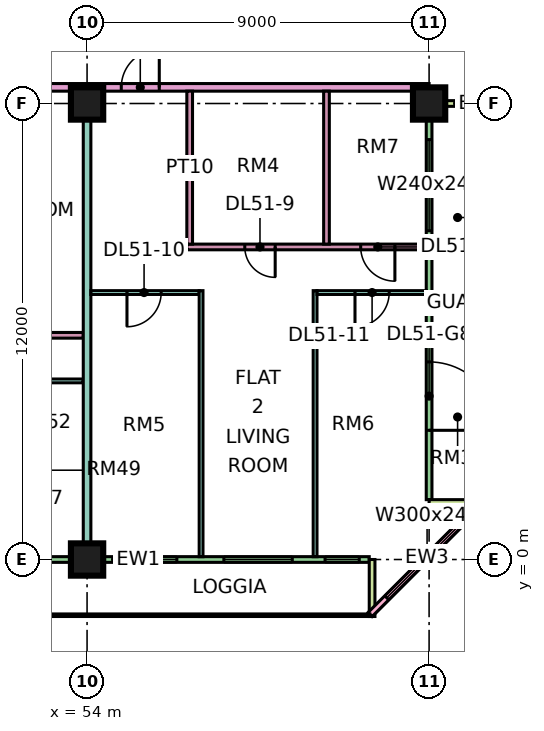
"""IFC4 building model, lengths in metres.
Left out: names, types, materials, properties, quantities, classifications, styles, units other than length and angle.
Written with IfcOpenShell. Run it as: python <this file> out.ifc"""

import sys

from ifc_helpers import new_model, si_unit, direction, frame, frame_2d, origin, origin_2d, place, context, subcontext, project, spatial, rectangle, extrude, element, fill, save


model = new_model("IFC4")
c1 = context("Model", 3, precision=1e-05, world=origin(), true_north=direction((0.0, 1.0)))
c2 = subcontext(c1, "Body", "Model", "MODEL_VIEW")
j1 = project(units=[si_unit("LENGTHUNIT", "METRE"), si_unit("PLANEANGLEUNIT", "RADIAN")], contexts=[c1])
p1 = place(None, origin())
s1 = spatial("IfcSite", under=j1, at=p1, CompositionType="ELEMENT")
p2 = place(p1, origin())
s2 = spatial("IfcBuilding", under=s1, at=p2, CompositionType="ELEMENT")
p3 = place(p2, frame((0.0, 0.0, 219.15)))
s3 = spatial("IfcBuildingStorey", under=s2, at=p3, CompositionType="ELEMENT", Elevation=219.15)
for number, where, z_axis, x_axis in (
    (1, (54.0, 0.0, 0.0), (0.0, 0.0, 1.0), (1.0, 0.0, 0.0)),
    (2, (54.0, 12.0, 0.0), (0.0, 0.0, 1.0), (1.0, 0.0, 0.0)),
    (3, (63.0, 12.0, 0.0), (0.0, 0.0, 1.0), (1.0, 0.0, 0.0)),
):
    element("IfcColumn", number, at=place(p3, frame(where, z_axis=z_axis, x_axis=x_axis)), inside=s3, PredefinedType="COLUMN", context=c2, shape_type="SweptSolid", body=[
        extrude(rectangle(XDim=0.85, YDim=0.85, at=origin_2d()), origin(), (0.0, 0.0, 1.0), 3.75),
    ])
p4 = place(p3, frame((48.075, 0.0, 0.0), z_axis=(0.0, 0.0, 1.0), x_axis=(1.0, 0.0, 0.0)))
e4 = element("IfcWall", 4, at=p4, inside=s3, PredefinedType="SOLIDWALL", context=c2, shape_type="SweptSolid", body=[
    extrude(rectangle(XDim=13.35, YDim=0.15, at=frame_2d((6.675, 0.0))), origin(), (0.0, 0.0, 1.0), 3.35),
])
p5 = place(p4, frame((0.562, 0.0, 0.45)))
e5 = element("IfcOpeningElement", 5, at=p5, cuts=e4, PredefinedType="OPENING", context=c2, shape_type="SweptSolid", body=[
    extrude(rectangle(XDim=1.8, YDim=2.4, at=frame_2d((0.9, 1.2))), frame((0.0, 0.085, 0.0), z_axis=(0.0, -1.0, 0.0), x_axis=(1.0, 0.0, 0.0)), (0.0, 0.0, 1.0), 0.17),
])
p6 = place(p4, frame((3.562, 0.0, 0.0)))
e6 = element("IfcOpeningElement", 6, at=p6, cuts=e4, PredefinedType="OPENING", context=c2, shape_type="SweptSolid", body=[
    extrude(rectangle(XDim=1.2, YDim=2.4, at=frame_2d((0.6, 1.2))), frame((0.0, 0.085, 0.0), z_axis=(0.0, -1.0, 0.0), x_axis=(1.0, 0.0, 0.0)), (0.0, 0.0, 1.0), 0.17),
])
p7 = place(p4, frame((7.087, 0.0, 0.45)))
e7 = element("IfcOpeningElement", 7, at=p7, cuts=e4, PredefinedType="OPENING", context=c2, shape_type="SweptSolid", body=[
    extrude(rectangle(XDim=1.2, YDim=2.4, at=frame_2d((0.6, 1.2))), frame((0.0, 0.085, 0.0), z_axis=(0.0, -1.0, 0.0), x_axis=(1.0, 0.0, 0.0)), (0.0, 0.0, 1.0), 0.17),
])
p8 = place(p4, frame((9.525, 0.0, 0.45)))
e8 = element("IfcOpeningElement", 8, at=p8, cuts=e4, PredefinedType="OPENING", context=c2, shape_type="SweptSolid", body=[
    extrude(rectangle(XDim=1.8, YDim=2.4, at=frame_2d((0.9, 1.2))), frame((0.0, 0.085, 0.0), z_axis=(0.0, -1.0, 0.0), x_axis=(1.0, 0.0, 0.0)), (0.0, 0.0, 1.0), 0.17),
])
p9 = place(p4, frame((12.188, 0.0, 0.45)))
e9 = element("IfcOpeningElement", 9, at=p9, cuts=e4, PredefinedType="OPENING", context=c2, shape_type="SweptSolid", body=[
    extrude(rectangle(XDim=0.9, YDim=2.4, at=frame_2d((0.45, 1.2))), frame((0.0, 0.085, 0.0), z_axis=(0.0, -1.0, 0.0), x_axis=(1.0, 0.0, 0.0)), (0.0, 0.0, 1.0), 0.17),
])
p10 = place(p3, frame((61.5, -1.5, 0.0), z_axis=(0.0, 0.0, 1.0), x_axis=(0.0, 1.0, 0.0)))
e10 = element("IfcWall", 10, at=p10, inside=s3, PredefinedType="SOLIDWALL", context=c2, shape_type="SweptSolid", body=[
    extrude(rectangle(XDim=1.5, YDim=0.15, at=frame_2d((0.75, 0.0))), origin(), (0.0, 0.0, 1.0), 3.35),
])
p11 = place(p3, frame((61.447, -1.447, 0.0), z_axis=(0.0, 0.0, 1.0), x_axis=(0.707106781187, 0.707106781187, 0.0)))
e11 = element("IfcWall", 11, at=p11, inside=s3, PredefinedType="SOLIDWALL", context=c2, shape_type="SweptSolid", body=[
    extrude(rectangle(XDim=4.243, YDim=0.15, at=frame_2d((2.121, 0.0))), origin(), (0.0, 0.0, 1.0), 3.35),
])
p12 = place(p11, frame((0.621, 0.0, 0.45)))
e12 = element("IfcOpeningElement", 12, at=p12, cuts=e11, PredefinedType="OPENING", context=c2, shape_type="SweptSolid", body=[
    extrude(rectangle(XDim=3.0, YDim=2.4, at=frame_2d((1.5, 1.2))), frame((0.0, 0.085, 0.0), z_axis=(0.0, -1.0, 0.0), x_axis=(1.0, 0.0, 0.0)), (0.0, 0.0, 1.0), 0.17),
])
p13 = place(p3, frame((63.0, 1.575, 0.0), z_axis=(0.0, 0.0, 1.0), x_axis=(0.0, 1.0, 0.0)))
e13 = element("IfcWall", 13, at=p13, inside=s3, PredefinedType="SOLIDWALL", context=c2, shape_type="SweptSolid", body=[
    extrude(rectangle(XDim=10.35, YDim=0.15, at=frame_2d((5.175, 0.0))), origin(), (0.0, 0.0, 1.0), 3.35),
])
p14 = place(p13, frame((1.825, 0.0, 0.0)))
e14 = element("IfcOpeningElement", 14, at=p14, cuts=e13, PredefinedType="OPENING", context=c2, shape_type="SweptSolid", body=[
    extrude(rectangle(XDim=1.8, YDim=2.4, at=frame_2d((0.9, 1.2))), frame((0.0, 0.085, 0.0), z_axis=(0.0, -1.0, 0.0), x_axis=(1.0, 0.0, 0.0)), (0.0, 0.0, 1.0), 0.17),
])
p15 = place(p13, frame((7.075, 0.0, 0.45)))
e15 = element("IfcOpeningElement", 15, at=p15, cuts=e13, PredefinedType="OPENING", context=c2, shape_type="SweptSolid", body=[
    extrude(rectangle(XDim=2.4, YDim=2.4, at=frame_2d((1.2, 1.2))), frame((0.0, 0.085, 0.0), z_axis=(0.0, -1.0, 0.0), x_axis=(1.0, 0.0, 0.0)), (0.0, 0.0, 1.0), 0.17),
])
for number, where, z_axis, x_axis in (
    (16, (64.5, 1.5, 0.0), (0.0, 0.0, 1.0), (-1.0, 0.0, 0.0)),
    (17, (64.5, 12.0, 0.0), (0.0, 0.0, 1.0), (-1.0, 0.0, 0.0)),
):
    element("IfcWall", number, at=place(p3, frame(where, z_axis=z_axis, x_axis=x_axis)), inside=s3, PredefinedType="SOLIDWALL", context=c2, shape_type="SweptSolid", body=[
        extrude(rectangle(XDim=1.5, YDim=0.15, at=frame_2d((0.75, 0.0))), origin(), (0.0, 0.0, 1.0), 3.35),
    ])
p16 = place(p3, frame((33.05, 4.7, 0.0), z_axis=(0.0, 0.0, 1.0), x_axis=(1.0, 0.0, 0.0)))
e18 = element("IfcWall", 18, at=p16, inside=s3, PredefinedType="PARTITIONING", context=c2, shape_type="SweptSolid", body=[
    extrude(rectangle(XDim=20.85, YDim=0.1, at=frame_2d((10.425, 0.0))), origin(), (0.0, 0.0, 1.0), 3.35),
])
p17 = place(p16, frame((10.0, 0.0, 0.0)))
e19 = element("IfcOpeningElement", 19, at=p17, cuts=e18, PredefinedType="OPENING", context=c2, shape_type="SweptSolid", body=[
    extrude(rectangle(XDim=0.9, YDim=2.1, at=frame_2d((0.45, 1.05))), frame((0.0, 0.06, 0.0), z_axis=(0.0, -1.0, 0.0), x_axis=(1.0, 0.0, 0.0)), (0.0, 0.0, 1.0), 0.12),
])
p18 = place(p16, frame((13.0, 0.0, 0.0)))
e20 = element("IfcOpeningElement", 20, at=p18, cuts=e18, PredefinedType="OPENING", context=c2, shape_type="SweptSolid", body=[
    extrude(rectangle(XDim=0.9, YDim=2.1, at=frame_2d((0.45, 1.05))), frame((0.0, 0.06, 0.0), z_axis=(0.0, -1.0, 0.0), x_axis=(1.0, 0.0, 0.0)), (0.0, 0.0, 1.0), 0.12),
])
p19 = place(p16, frame((16.0, 0.0, 0.0)))
e21 = element("IfcOpeningElement", 21, at=p19, cuts=e18, PredefinedType="OPENING", context=c2, shape_type="SweptSolid", body=[
    extrude(rectangle(XDim=0.9, YDim=2.1, at=frame_2d((0.45, 1.05))), frame((0.0, 0.06, 0.0), z_axis=(0.0, -1.0, 0.0), x_axis=(1.0, 0.0, 0.0)), (0.0, 0.0, 1.0), 0.12),
])
p20 = place(p16, frame((19.0, 0.0, 0.0)))
e22 = element("IfcOpeningElement", 22, at=p20, cuts=e18, PredefinedType="OPENING", context=c2, shape_type="SweptSolid", body=[
    extrude(rectangle(XDim=0.9, YDim=2.1, at=frame_2d((0.45, 1.05))), frame((0.0, 0.06, 0.0), z_axis=(0.0, -1.0, 0.0), x_axis=(1.0, 0.0, 0.0)), (0.0, 0.0, 1.0), 0.12),
])
p21 = place(p16, frame((4.0, 0.0, 0.0)))
e23 = element("IfcOpeningElement", 23, at=p21, cuts=e18, PredefinedType="OPENING", context=c2, shape_type="SweptSolid", body=[
    extrude(rectangle(XDim=0.9, YDim=2.1, at=frame_2d((0.45, 1.05))), frame((0.0, 0.06, 0.0), z_axis=(0.0, -1.0, 0.0), x_axis=(1.0, 0.0, 0.0)), (0.0, 0.0, 1.0), 0.12),
])
p22 = place(p3, frame((40.65, 12.425, 0.0), z_axis=(0.0, 0.0, 1.0), x_axis=(1.0, 0.0, 0.0)))
e24 = element("IfcWall", 24, at=p22, inside=s3, PredefinedType="PARTITIONING", context=c2, shape_type="SweptSolid", body=[
    extrude(rectangle(XDim=22.35, YDim=0.2, at=frame_2d((11.175, 0.0))), origin(), (0.0, 0.0, 1.0), 3.35),
])
p23 = place(p22, frame((14.25, 0.0, 0.0)))
e25 = element("IfcOpeningElement", 25, at=p23, cuts=e24, PredefinedType="OPENING", context=c2, shape_type="SweptSolid", body=[
    extrude(rectangle(XDim=1.0, YDim=2.1, at=frame_2d((0.5, 1.05))), frame((0.0, 0.11, 0.0), z_axis=(0.0, -1.0, 0.0), x_axis=(1.0, 0.0, 0.0)), (0.0, 0.0, 1.0), 0.22),
])
p24 = place(p22, frame((1.05, 0.0, 0.0)))
e26 = element("IfcOpeningElement", 26, at=p24, cuts=e24, PredefinedType="OPENING", context=c2, shape_type="SweptSolid", body=[
    extrude(rectangle(XDim=1.0, YDim=2.1, at=frame_2d((0.5, 1.05))), frame((0.0, 0.11, 0.0), z_axis=(0.0, -1.0, 0.0), x_axis=(1.0, 0.0, 0.0)), (0.0, 0.0, 1.0), 0.22),
])
p25 = place(p3, frame((43.575, 5.9, 0.0), z_axis=(0.0, 0.0, 1.0), x_axis=(1.0, 0.0, 0.0)))
e27 = element("IfcWall", 27, at=p25, inside=s3, PredefinedType="PARTITIONING", context=c2, shape_type="SweptSolid", body=[
    extrude(rectangle(XDim=10.325, YDim=0.15, at=frame_2d((5.163, 0.0))), origin(), (0.0, 0.0, 1.0), 3.35),
])
p26 = place(p25, frame((1.825, 0.0, 0.0)))
e28 = element("IfcOpeningElement", 28, at=p26, cuts=e27, PredefinedType="OPENING", context=c2, shape_type="SweptSolid", body=[
    extrude(rectangle(XDim=0.8, YDim=2.1, at=frame_2d((0.4, 1.05))), frame((0.0, 0.085, 0.0), z_axis=(0.0, -1.0, 0.0), x_axis=(1.0, 0.0, 0.0)), (0.0, 0.0, 1.0), 0.17),
])
p27 = place(p25, frame((6.975, 0.0, 0.0)))
e29 = element("IfcOpeningElement", 29, at=p27, cuts=e27, PredefinedType="OPENING", context=c2, shape_type="SweptSolid", body=[
    extrude(rectangle(XDim=0.9, YDim=2.1, at=frame_2d((0.45, 1.05))), frame((0.0, 0.085, 0.0), z_axis=(0.0, -1.0, 0.0), x_axis=(1.0, 0.0, 0.0)), (0.0, 0.0, 1.0), 0.17),
])
p28 = place(p3, frame((54.0, 0.074, 0.0), z_axis=(0.0, 0.0, 1.0), x_axis=(0.0, 1.0, 0.0)))
e30 = element("IfcWall", 30, at=p28, inside=s3, PredefinedType="PARTITIONING", context=c2, shape_type="SweptSolid", body=[
    extrude(rectangle(XDim=12.251, YDim=0.2, at=frame_2d((6.125, 0.0))), origin(), (0.0, 0.0, 1.0), 3.35),
])
p29 = place(p3, frame((54.1, 7.025, 0.0), z_axis=(0.0, 0.0, 1.0), x_axis=(1.0, 0.0, 0.0)))
e31 = element("IfcWall", 31, at=p29, inside=s3, PredefinedType="PARTITIONING", context=c2, shape_type="SweptSolid", body=[
    extrude(rectangle(XDim=2.85, YDim=0.1, at=frame_2d((1.425, 0.0))), origin(), (0.0, 0.0, 1.0), 3.35),
])
p30 = place(p29, frame((0.95, 0.0, 0.0)))
e32 = element("IfcOpeningElement", 32, at=p30, cuts=e31, PredefinedType="OPENING", context=c2, shape_type="SweptSolid", body=[
    extrude(rectangle(XDim=0.9, YDim=2.1, at=frame_2d((0.45, 1.05))), frame((0.0, 0.06, 0.0), z_axis=(0.0, -1.0, 0.0), x_axis=(1.0, 0.0, 0.0)), (0.0, 0.0, 1.0), 0.12),
])
p31 = place(p3, frame((56.625, 8.225, 0.0), z_axis=(0.0, 0.0, 1.0), x_axis=(1.0, 0.0, 0.0)))
e33 = element("IfcWall", 33, at=p31, inside=s3, PredefinedType="PARTITIONING", context=c2, shape_type="SweptSolid", body=[
    extrude(rectangle(XDim=6.301, YDim=0.15, at=frame_2d((3.15, 0.0))), origin(), (0.0, 0.0, 1.0), 3.35),
])
p32 = place(p31, frame((1.525, 0.0, 0.0)))
e34 = element("IfcOpeningElement", 34, at=p32, cuts=e33, PredefinedType="OPENING", context=c2, shape_type="SweptSolid", body=[
    extrude(rectangle(XDim=0.8, YDim=2.1, at=frame_2d((0.4, 1.05))), frame((0.0, 0.085, 0.0), z_axis=(0.0, -1.0, 0.0), x_axis=(1.0, 0.0, 0.0)), (0.0, 0.0, 1.0), 0.17),
])
p33 = place(p31, frame((4.575, 0.0, 0.0)))
e35 = element("IfcOpeningElement", 35, at=p33, cuts=e33, PredefinedType="OPENING", context=c2, shape_type="SweptSolid", body=[
    extrude(rectangle(XDim=0.9, YDim=2.1, at=frame_2d((0.45, 1.05))), frame((0.0, 0.085, 0.0), z_axis=(0.0, -1.0, 0.0), x_axis=(1.0, 0.0, 0.0)), (0.0, 0.0, 1.0), 0.17),
])
p34 = place(p3, frame((56.7, 8.3, 0.0), z_axis=(0.0, 0.0, 1.0), x_axis=(0.0, 1.0, 0.0)))
e36 = element("IfcWall", 36, at=p34, inside=s3, PredefinedType="PARTITIONING", context=c2, shape_type="SweptSolid", body=[
    extrude(rectangle(XDim=4.025, YDim=0.15, at=frame_2d((2.012, 0.0))), origin(), (0.0, 0.0, 1.0), 3.35),
])
for number, where, z_axis, x_axis in (
    (37, (57.0, 0.074, 0.0), (0.0, 0.0, 1.0), (0.0, 1.0, 0.0)),
    (38, (60.0, 0.074, 0.0), (0.0, 0.0, 1.0), (0.0, 1.0, 0.0)),
):
    element("IfcWall", number, at=place(p3, frame(where, z_axis=z_axis, x_axis=x_axis)), inside=s3, PredefinedType="PARTITIONING", context=c2, shape_type="SweptSolid", body=[
        extrude(rectangle(XDim=7.001, YDim=0.1, at=frame_2d((3.5, 0.0))), origin(), (0.0, 0.0, 1.0), 3.35),
    ])
p35 = place(p3, frame((60.05, 7.025, 0.0), z_axis=(0.0, 0.0, 1.0), x_axis=(1.0, 0.0, 0.0)))
e39 = element("IfcWall", 39, at=p35, inside=s3, PredefinedType="PARTITIONING", context=c2, shape_type="SweptSolid", body=[
    extrude(rectangle(XDim=2.876, YDim=0.1, at=frame_2d((1.438, 0.0))), origin(), (0.0, 0.0, 1.0), 3.35),
])
p36 = place(p35, frame((1.0, 0.0, 0.0)))
e40 = element("IfcOpeningElement", 40, at=p36, cuts=e39, PredefinedType="OPENING", context=c2, shape_type="SweptSolid", body=[
    extrude(rectangle(XDim=0.9, YDim=2.1, at=frame_2d((0.45, 1.05))), frame((0.0, 0.06, 0.0), z_axis=(0.0, -1.0, 0.0), x_axis=(1.0, 0.0, 0.0)), (0.0, 0.0, 1.0), 0.12),
])
p37 = place(p3, frame((60.3, 8.3, 0.0), z_axis=(0.0, 0.0, 1.0), x_axis=(0.0, 1.0, 0.0)))
e41 = element("IfcWall", 41, at=p37, inside=s3, PredefinedType="PARTITIONING", context=c2, shape_type="SweptSolid", body=[
    extrude(rectangle(XDim=4.025, YDim=0.15, at=frame_2d((2.012, 0.0))), origin(), (0.0, 0.0, 1.0), 3.35),
])
p38 = place(p7, origin())
e42 = element("IfcWindow", 42, at=p38, inside=s3, PartitioningType="SINGLE_PANEL", PredefinedType="WINDOW", context=c2, shape_type="SweptSolid", body=[
    extrude(rectangle(XDim=1.2, YDim=2.4, at=frame_2d((0.6, 1.2))), frame((0.0, 0.03, 0.0), z_axis=(0.0, -1.0, 0.0), x_axis=(1.0, 0.0, 0.0)), (0.0, 0.0, 1.0), 0.06),
])
fill(e7, e42)
p39 = place(p8, origin())
e43 = element("IfcWindow", 43, at=p39, inside=s3, PartitioningType="SINGLE_PANEL", PredefinedType="WINDOW", context=c2, shape_type="SweptSolid", body=[
    extrude(rectangle(XDim=1.8, YDim=2.4, at=frame_2d((0.9, 1.2))), frame((0.0, 0.03, 0.0), z_axis=(0.0, -1.0, 0.0), x_axis=(1.0, 0.0, 0.0)), (0.0, 0.0, 1.0), 0.06),
])
fill(e8, e43)
p40 = place(p9, origin())
e44 = element("IfcWindow", 44, at=p40, inside=s3, PartitioningType="SINGLE_PANEL", PredefinedType="WINDOW", context=c2, shape_type="SweptSolid", body=[
    extrude(rectangle(XDim=0.9, YDim=2.4, at=frame_2d((0.45, 1.2))), frame((0.0, 0.03, 0.0), z_axis=(0.0, -1.0, 0.0), x_axis=(1.0, 0.0, 0.0)), (0.0, 0.0, 1.0), 0.06),
])
fill(e9, e44)
p41 = place(p12, origin())
e45 = element("IfcWindow", 45, at=p41, inside=s3, PartitioningType="SINGLE_PANEL", PredefinedType="WINDOW", context=c2, shape_type="SweptSolid", body=[
    extrude(rectangle(XDim=3.0, YDim=2.4, at=frame_2d((1.5, 1.2))), frame((0.0, 0.03, 0.0), z_axis=(0.0, -1.0, 0.0), x_axis=(1.0, 0.0, 0.0)), (0.0, 0.0, 1.0), 0.06),
])
fill(e12, e45)
p42 = place(p14, frame((1.8, 0.0, 0.0), z_axis=(0.0, 0.0, 1.0), x_axis=(-1.0, 0.0, 0.0)))
e46 = element("IfcDoor", 46, at=p42, inside=s3, OperationType="DOUBLE_DOOR_SINGLE_SWING", PredefinedType="DOOR", context=c2, shape_type="SweptSolid", body=[
    extrude(rectangle(XDim=1.8, YDim=2.4, at=frame_2d((0.9, 1.2))), frame((0.0, 0.025, 0.0), z_axis=(0.0, -1.0, 0.0), x_axis=(1.0, 0.0, 0.0)), (0.0, 0.0, 1.0), 0.05),
])
fill(e14, e46)
p43 = place(p15, origin())
e47 = element("IfcWindow", 47, at=p43, inside=s3, PartitioningType="SINGLE_PANEL", PredefinedType="WINDOW", context=c2, shape_type="SweptSolid", body=[
    extrude(rectangle(XDim=2.4, YDim=2.4, at=frame_2d((1.2, 1.2))), frame((0.0, 0.03, 0.0), z_axis=(0.0, -1.0, 0.0), x_axis=(1.0, 0.0, 0.0)), (0.0, 0.0, 1.0), 0.06),
])
fill(e15, e47)
p44 = place(p32, origin())
e48 = element("IfcDoor", 48, at=p44, inside=s3, OperationType="SINGLE_SWING_RIGHT", PredefinedType="DOOR", context=c2, shape_type="SweptSolid", body=[
    extrude(rectangle(XDim=0.8, YDim=2.1, at=frame_2d((0.4, 1.05))), frame((0.0, 0.025, 0.0), z_axis=(0.0, -1.0, 0.0), x_axis=(1.0, 0.0, 0.0)), (0.0, 0.0, 1.0), 0.05),
])
fill(e34, e48)
p45 = place(p30, frame((0.9, 0.0, 0.0), z_axis=(0.0, 0.0, 1.0), x_axis=(-1.0, 0.0, 0.0)))
e49 = element("IfcDoor", 49, at=p45, inside=s3, OperationType="SINGLE_SWING_LEFT", PredefinedType="DOOR", context=c2, shape_type="SweptSolid", body=[
    extrude(rectangle(XDim=0.9, YDim=2.1, at=frame_2d((0.45, 1.05))), frame((0.0, 0.025, 0.0), z_axis=(0.0, -1.0, 0.0), x_axis=(1.0, 0.0, 0.0)), (0.0, 0.0, 1.0), 0.05),
])
fill(e32, e49)
p46 = place(p36, frame((0.9, 0.0, 0.0), z_axis=(0.0, 0.0, 1.0), x_axis=(-1.0, 0.0, 0.0)))
e50 = element("IfcDoor", 50, at=p46, inside=s3, OperationType="SINGLE_SWING_LEFT", PredefinedType="DOOR", context=c2, shape_type="SweptSolid", body=[
    extrude(rectangle(XDim=0.9, YDim=2.1, at=frame_2d((0.45, 1.05))), frame((0.0, 0.025, 0.0), z_axis=(0.0, -1.0, 0.0), x_axis=(1.0, 0.0, 0.0)), (0.0, 0.0, 1.0), 0.05),
])
fill(e40, e50)
p47 = place(p33, origin())
e51 = element("IfcDoor", 51, at=p47, inside=s3, OperationType="SINGLE_SWING_RIGHT", PredefinedType="DOOR", context=c2, shape_type="SweptSolid", body=[
    extrude(rectangle(XDim=0.9, YDim=2.1, at=frame_2d((0.45, 1.05))), frame((0.0, 0.025, 0.0), z_axis=(0.0, -1.0, 0.0), x_axis=(1.0, 0.0, 0.0)), (0.0, 0.0, 1.0), 0.05),
])
fill(e35, e51)
p48 = place(p23, frame((1.0, 0.0, 0.0), z_axis=(0.0, 0.0, 1.0), x_axis=(-1.0, 0.0, 0.0)))
e52 = element("IfcDoor", 52, at=p48, inside=s3, OperationType="SINGLE_SWING_RIGHT", PredefinedType="DOOR", context=c2, shape_type="SweptSolid", body=[
    extrude(rectangle(XDim=1.0, YDim=2.1, at=frame_2d((0.5, 1.05))), frame((0.0, 0.025, 0.0), z_axis=(0.0, -1.0, 0.0), x_axis=(1.0, 0.0, 0.0)), (0.0, 0.0, 1.0), 0.05),
])
fill(e25, e52)
save(model, sys.argv[1])
